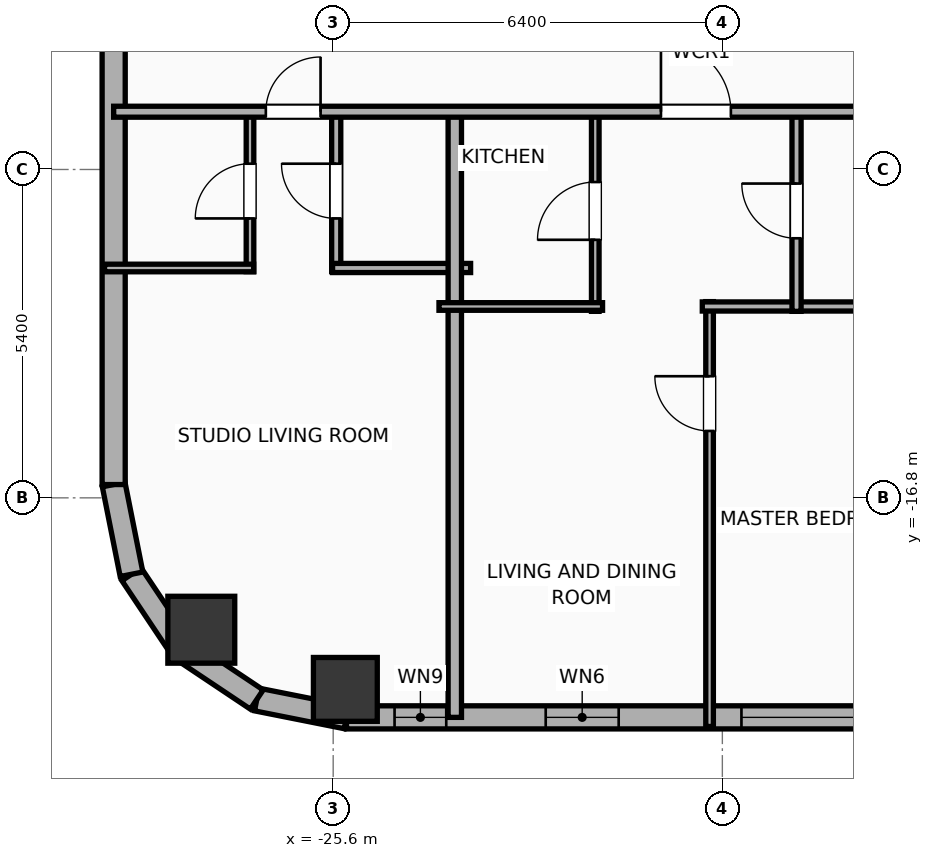
"""IFC4 building model, lengths in metres.
Left out: names, types, materials, properties, quantities, classifications, styles, units other than length and angle.
Written with IfcOpenShell. Run it as: python <this file> out.ifc"""

import sys

from ifc_helpers import new_model, si_unit, direction, frame, frame_2d, origin, origin_2d, place, context, subcontext, project, spatial, rectangle, hollow_rectangle, hollow_circle, extrude, element, fill, save


model = new_model("IFC4")
c1 = context("Model", 3, precision=1e-05, world=origin(), true_north=direction((0.0, 1.0)))
c2 = subcontext(c1, "Body", "Model", "MODEL_VIEW")
j1 = project(units=[si_unit("LENGTHUNIT", "METRE"), si_unit("PLANEANGLEUNIT", "RADIAN")], contexts=[c1])
p1 = place(None, origin())
s1 = spatial("IfcSite", under=j1, at=p1, CompositionType="ELEMENT")
p2 = place(p1, origin())
s2 = spatial("IfcBuilding", under=s1, at=p2, CompositionType="ELEMENT")
p3 = place(p2, frame((0.0, 0.0, 93.6)))
s3 = spatial("IfcBuildingStorey", under=s2, at=p3, CompositionType="ELEMENT", Elevation=93.6)
p4 = place(p3, frame((-25.4, -19.95, 0.0), z_axis=(0.0, 0.0, 1.0), x_axis=(1.0, 0.0, 0.0)))
e1 = element("IfcColumn", 1, at=p4, inside=s3, PredefinedType="COLUMN", context=c2, shape_type="SweptSolid", body=[
    extrude(hollow_rectangle(XDim=1.05, YDim=1.05, WallThickness=0.036, at=origin_2d()), origin(), (0.0, 0.0, 1.0), 3.9),
])
p5 = place(p3, frame((-27.769, -18.969, 0.0), z_axis=(0.0, 0.0, 1.0), x_axis=(1.0, 0.0, 0.0)))
e2 = element("IfcColumn", 2, at=p5, inside=s3, PredefinedType="COLUMN", context=c2, shape_type="SweptSolid", body=[
    extrude(hollow_circle(Radius=0.55, WallThickness=0.036, at=origin_2d()), origin(), (0.0, 0.0, 1.0), 3.9),
])
p6 = place(p3, frame((29.381, -20.41, 0.0), z_axis=(0.0, 0.0, 1.0), x_axis=(-1.0, 0.0, 0.0)))
e3 = element("IfcWall", 3, at=p6, inside=s3, PredefinedType="ELEMENTEDWALL", context=c2, shape_type="SweptSolid", body=[
    extrude(rectangle(XDim=54.763, YDim=0.38, at=frame_2d((27.381, 0.0))), origin(), (0.0, 0.0, 1.0), 3.65),
])
p7 = place(p6, frame((4.795, 0.0, 0.75)))
e4 = element("IfcOpeningElement", 4, at=p7, cuts=e3, PredefinedType="OPENING", context=c2, shape_type="SweptSolid", body=[
    extrude(rectangle(XDim=2.4, YDim=2.1, at=frame_2d((1.2, 1.05))), frame((0.0, 0.2, 0.0), z_axis=(0.0, -1.0, 0.0), x_axis=(1.0, 0.0, 0.0)), (0.0, 0.0, 1.0), 0.4),
])
p8 = place(p6, frame((33.877, 0.0, 0.75)))
e5 = element("IfcOpeningElement", 5, at=p8, cuts=e3, PredefinedType="OPENING", context=c2, shape_type="SweptSolid", body=[
    extrude(rectangle(XDim=2.4, YDim=2.1, at=frame_2d((1.2, 1.05))), frame((0.0, 0.2, 0.0), z_axis=(0.0, -1.0, 0.0), x_axis=(1.0, 0.0, 0.0)), (0.0, 0.0, 1.0), 0.4),
])
p9 = place(p6, frame((45.867, 0.0, 0.75)))
e6 = element("IfcOpeningElement", 6, at=p9, cuts=e3, PredefinedType="OPENING", context=c2, shape_type="SweptSolid", body=[
    extrude(rectangle(XDim=2.4, YDim=2.1, at=frame_2d((1.2, 1.05))), frame((0.0, 0.2, 0.0), z_axis=(0.0, -1.0, 0.0), x_axis=(1.0, 0.0, 0.0)), (0.0, 0.0, 1.0), 0.4),
])
p10 = place(p6, frame((53.122, 0.0, 0.75)))
e7 = element("IfcOpeningElement", 7, at=p10, cuts=e3, PredefinedType="OPENING", context=c2, shape_type="SweptSolid", body=[
    extrude(rectangle(XDim=0.85, YDim=2.05, at=frame_2d((0.425, 1.025))), frame((0.0, 0.2, 0.0), z_axis=(0.0, -1.0, 0.0), x_axis=(1.0, 0.0, 0.0)), (0.0, 0.0, 1.0), 0.4),
])
p11 = place(p6, frame((50.286, 0.0, 0.75)))
e8 = element("IfcOpeningElement", 8, at=p11, cuts=e3, PredefinedType="OPENING", context=c2, shape_type="SweptSolid", body=[
    extrude(rectangle(XDim=1.2, YDim=2.05, at=frame_2d((0.6, 1.025))), frame((0.0, 0.2, 0.0), z_axis=(0.0, -1.0, 0.0), x_axis=(1.0, 0.0, 0.0)), (0.0, 0.0, 1.0), 0.4),
])
p12 = place(p6, frame((41.846, 0.0, 0.75)))
e9 = element("IfcOpeningElement", 9, at=p12, cuts=e3, PredefinedType="OPENING", context=c2, shape_type="SweptSolid", body=[
    extrude(rectangle(XDim=1.2, YDim=2.05, at=frame_2d((0.6, 1.025))), frame((0.0, 0.2, 0.0), z_axis=(0.0, -1.0, 0.0), x_axis=(1.0, 0.0, 0.0)), (0.0, 0.0, 1.0), 0.4),
])
p13 = place(p6, frame((38.886, 0.0, 0.75)))
e10 = element("IfcOpeningElement", 10, at=p13, cuts=e3, PredefinedType="OPENING", context=c2, shape_type="SweptSolid", body=[
    extrude(rectangle(XDim=1.2, YDim=2.05, at=frame_2d((0.6, 1.025))), frame((0.0, 0.2, 0.0), z_axis=(0.0, -1.0, 0.0), x_axis=(1.0, 0.0, 0.0)), (0.0, 0.0, 1.0), 0.4),
])
p14 = place(p6, frame((30.926, 0.0, 0.75)))
e11 = element("IfcOpeningElement", 11, at=p14, cuts=e3, PredefinedType="OPENING", context=c2, shape_type="SweptSolid", body=[
    extrude(rectangle(XDim=1.2, YDim=2.05, at=frame_2d((0.6, 1.025))), frame((0.0, 0.2, 0.0), z_axis=(0.0, -1.0, 0.0), x_axis=(1.0, 0.0, 0.0)), (0.0, 0.0, 1.0), 0.4),
])
p15 = place(p6, frame((27.486, 0.0, 0.75)))
e12 = element("IfcOpeningElement", 12, at=p15, cuts=e3, PredefinedType="OPENING", context=c2, shape_type="SweptSolid", body=[
    extrude(rectangle(XDim=1.2, YDim=2.05, at=frame_2d((0.6, 1.025))), frame((0.0, 0.2, 0.0), z_axis=(0.0, -1.0, 0.0), x_axis=(1.0, 0.0, 0.0)), (0.0, 0.0, 1.0), 0.4),
])
p16 = place(p6, frame((23.686, 0.0, 0.75)))
e13 = element("IfcOpeningElement", 13, at=p16, cuts=e3, PredefinedType="OPENING", context=c2, shape_type="SweptSolid", body=[
    extrude(rectangle(XDim=1.2, YDim=2.05, at=frame_2d((0.6, 1.025))), frame((0.0, 0.2, 0.0), z_axis=(0.0, -1.0, 0.0), x_axis=(1.0, 0.0, 0.0)), (0.0, 0.0, 1.0), 0.4),
])
p17 = place(p6, frame((19.886, 0.0, 0.75)))
e14 = element("IfcOpeningElement", 14, at=p17, cuts=e3, PredefinedType="OPENING", context=c2, shape_type="SweptSolid", body=[
    extrude(rectangle(XDim=1.2, YDim=2.05, at=frame_2d((0.6, 1.025))), frame((0.0, 0.2, 0.0), z_axis=(0.0, -1.0, 0.0), x_axis=(1.0, 0.0, 0.0)), (0.0, 0.0, 1.0), 0.4),
])
p18 = place(p6, frame((16.086, 0.0, 0.75)))
e15 = element("IfcOpeningElement", 15, at=p18, cuts=e3, PredefinedType="OPENING", context=c2, shape_type="SweptSolid", body=[
    extrude(rectangle(XDim=1.2, YDim=2.05, at=frame_2d((0.6, 1.025))), frame((0.0, 0.2, 0.0), z_axis=(0.0, -1.0, 0.0), x_axis=(1.0, 0.0, 0.0)), (0.0, 0.0, 1.0), 0.4),
])
p19 = place(p6, frame((12.286, 0.0, 0.75)))
e16 = element("IfcOpeningElement", 16, at=p19, cuts=e3, PredefinedType="OPENING", context=c2, shape_type="SweptSolid", body=[
    extrude(rectangle(XDim=1.2, YDim=2.05, at=frame_2d((0.6, 1.025))), frame((0.0, 0.2, 0.0), z_axis=(0.0, -1.0, 0.0), x_axis=(1.0, 0.0, 0.0)), (0.0, 0.0, 1.0), 0.4),
])
p20 = place(p6, frame((8.486, 0.0, 0.75)))
e17 = element("IfcOpeningElement", 17, at=p20, cuts=e3, PredefinedType="OPENING", context=c2, shape_type="SweptSolid", body=[
    extrude(rectangle(XDim=1.2, YDim=2.05, at=frame_2d((0.6, 1.025))), frame((0.0, 0.2, 0.0), z_axis=(0.0, -1.0, 0.0), x_axis=(1.0, 0.0, 0.0)), (0.0, 0.0, 1.0), 0.4),
])
p21 = place(p6, frame((2.277, 0.0, 0.75)))
e18 = element("IfcOpeningElement", 18, at=p21, cuts=e3, PredefinedType="OPENING", context=c2, shape_type="SweptSolid", body=[
    extrude(rectangle(XDim=1.2, YDim=2.05, at=frame_2d((0.6, 1.025))), frame((0.0, 0.2, 0.0), z_axis=(0.0, -1.0, 0.0), x_axis=(1.0, 0.0, 0.0)), (0.0, 0.0, 1.0), 0.4),
])
p22 = place(p6, frame((1.071, 0.0, 0.75)))
e19 = element("IfcOpeningElement", 19, at=p22, cuts=e3, PredefinedType="OPENING", context=c2, shape_type="SweptSolid", body=[
    extrude(rectangle(XDim=0.52, YDim=2.05, at=frame_2d((0.26, 1.025))), frame((0.0, 0.2, 0.0), z_axis=(0.0, -1.0, 0.0), x_axis=(1.0, 0.0, 0.0)), (0.0, 0.0, 1.0), 0.4),
])
p23 = place(p3, frame((-25.381, -20.41, 0.0), z_axis=(0.0, 0.0, 1.0), x_axis=(-0.980786132421, 0.195086038585, 0.0)))
e20 = element("IfcWall", 20, at=p23, inside=s3, PredefinedType="ELEMENTEDWALL", context=c2, shape_type="SweptSolid", body=[
    extrude(rectangle(XDim=1.504, YDim=0.38, at=frame_2d((0.752, 0.0))), origin(), (0.0, 0.0, 1.0), 3.65),
])
p24 = place(p3, frame((-26.857, -20.116, 0.0), z_axis=(0.0, 0.0, 1.0), x_axis=(-0.831468045563, 0.555572577804, 0.0)))
e21 = element("IfcWall", 21, at=p24, inside=s3, PredefinedType="ELEMENTEDWALL", context=c2, shape_type="SweptSolid", body=[
    extrude(rectangle(XDim=1.485, YDim=0.38, at=frame_2d((0.742, 0.0))), origin(), (0.0, 0.0, 1.0), 3.65),
])
p25 = place(p3, frame((-28.091, -19.292, 0.0), z_axis=(0.0, 0.0, 1.0), x_axis=(-0.555610286119, 0.831442848281, 0.0)))
e22 = element("IfcWall", 22, at=p25, inside=s3, PredefinedType="ELEMENTEDWALL", context=c2, shape_type="SweptSolid", body=[
    extrude(rectangle(XDim=1.485, YDim=0.38, at=frame_2d((0.743, 0.0))), origin(), (0.0, 0.0, 1.0), 3.65),
])
p26 = place(p3, frame((-28.917, -18.057, 0.0), z_axis=(0.0, 0.0, 1.0), x_axis=(-0.195086038585, 0.980786132421, 0.0)))
e23 = element("IfcWall", 23, at=p26, inside=s3, PredefinedType="ELEMENTEDWALL", context=c2, shape_type="SweptSolid", body=[
    extrude(rectangle(XDim=1.504, YDim=0.38, at=frame_2d((0.752, 0.0))), origin(), (0.0, 0.0, 1.0), 3.65),
])
p27 = place(p3, frame((-29.21, -16.581, 0.0), z_axis=(0.0, 0.0, 1.0), x_axis=(0.0, 1.0, 0.0)))
e24 = element("IfcWall", 24, at=p27, inside=s3, PredefinedType="ELEMENTEDWALL", context=c2, shape_type="SweptSolid", body=[
    extrude(rectangle(XDim=34.363, YDim=0.38, at=frame_2d((17.181, 0.0))), origin(), (0.0, 0.0, 1.0), 3.65),
])
p28 = place(p27, frame((30.932, 0.0, 0.75)))
e25 = element("IfcOpeningElement", 25, at=p28, cuts=e24, PredefinedType="OPENING", context=c2, shape_type="SweptSolid", body=[
    extrude(rectangle(XDim=1.2, YDim=2.05, at=frame_2d((0.6, 1.025))), frame((0.0, 0.2, 0.0), z_axis=(0.0, -1.0, 0.0), x_axis=(1.0, 0.0, 0.0)), (0.0, 0.0, 1.0), 0.4),
])
p29 = place(p27, frame((20.501, 0.0, 0.75)))
e26 = element("IfcOpeningElement", 26, at=p29, cuts=e24, PredefinedType="OPENING", context=c2, shape_type="SweptSolid", body=[
    extrude(rectangle(XDim=1.2, YDim=2.05, at=frame_2d((0.6, 1.025))), frame((0.0, 0.2, 0.0), z_axis=(0.0, -1.0, 0.0), x_axis=(1.0, 0.0, 0.0)), (0.0, 0.0, 1.0), 0.4),
])
p30 = place(p27, frame((11.601, 0.0, 0.75)))
e27 = element("IfcOpeningElement", 27, at=p30, cuts=e24, PredefinedType="OPENING", context=c2, shape_type="SweptSolid", body=[
    extrude(rectangle(XDim=1.2, YDim=2.05, at=frame_2d((0.6, 1.025))), frame((0.0, 0.2, 0.0), z_axis=(0.0, -1.0, 0.0), x_axis=(1.0, 0.0, 0.0)), (0.0, 0.0, 1.0), 0.4),
])
p31 = place(p3, frame((-26.968, -13.08, 0.0), z_axis=(0.0, 0.0, 1.0), x_axis=(0.0, 1.0, 0.0)))
e28 = element("IfcWall", 28, at=p31, inside=s3, PredefinedType="PARTITIONING", context=c2, shape_type="SweptSolid", body=[
    extrude(rectangle(XDim=2.65, YDim=0.125, at=frame_2d((1.325, 0.0))), origin(), (0.0, 0.0, 1.0), 3.65),
])
p32 = place(p31, frame((0.875, 0.0, 0.0)))
e29 = element("IfcOpeningElement", 29, at=p32, cuts=e28, PredefinedType="OPENING", context=c2, shape_type="SweptSolid", body=[
    extrude(rectangle(XDim=0.9, YDim=2.05, at=frame_2d((0.45, 1.025))), frame((0.0, 0.073, 0.0), z_axis=(0.0, -1.0, 0.0), x_axis=(1.0, 0.0, 0.0)), (0.0, 0.0, 1.0), 0.145),
])
p33 = place(p3, frame((-25.55, -13.08, 0.0), z_axis=(0.0, 0.0, 1.0), x_axis=(0.0, 1.0, 0.0)))
e30 = element("IfcWall", 30, at=p33, inside=s3, PredefinedType="PLUMBINGWALL", context=c2, shape_type="SweptSolid", body=[
    extrude(rectangle(XDim=2.65, YDim=0.15, at=frame_2d((1.325, 0.0))), origin(), (0.0, 0.0, 1.0), 3.65),
])
p34 = place(p33, frame((0.875, 0.0, 0.0)))
e31 = element("IfcOpeningElement", 31, at=p34, cuts=e30, PredefinedType="OPENING", context=c2, shape_type="SweptSolid", body=[
    extrude(rectangle(XDim=0.9, YDim=2.05, at=frame_2d((0.45, 1.025))), frame((0.0, 0.085, 0.0), z_axis=(0.0, -1.0, 0.0), x_axis=(1.0, 0.0, 0.0)), (0.0, 0.0, 1.0), 0.17),
])
p35 = place(p3, frame((-29.36, -13.02, 0.0), z_axis=(0.0, 0.0, 1.0), x_axis=(1.0, 0.0, 0.0)))
e32 = element("IfcWall", 32, at=p35, inside=s3, PredefinedType="PARTITIONING", context=c2, shape_type="SweptSolid", body=[
    extrude(rectangle(XDim=2.452, YDim=0.125, at=frame_2d((1.226, 0.0))), origin(), (0.0, 0.0, 1.0), 3.65),
])
p36 = place(p3, frame((-25.61, -13.02, 0.0), z_axis=(0.0, 0.0, 1.0), x_axis=(1.0, 0.0, 0.0)))
e33 = element("IfcWall", 33, at=p36, inside=s3, PredefinedType="PLUMBINGWALL", context=c2, shape_type="SweptSolid", body=[
    extrude(rectangle(XDim=2.27, YDim=0.15, at=frame_2d((1.135, 0.0))), origin(), (0.0, 0.0, 1.0), 3.65),
])
p37 = place(p3, frame((-23.6, -20.41, 0.0), z_axis=(0.0, 0.0, 1.0), x_axis=(0.0, 1.0, 0.0)))
e34 = element("IfcWall", 34, at=p37, inside=s3, PredefinedType="PARTITIONING", context=c2, shape_type="SweptSolid", body=[
    extrude(rectangle(XDim=10.04, YDim=0.22, at=frame_2d((5.02, 0.0))), origin(), (0.0, 0.0, 1.0), 3.65),
])
p38 = place(p3, frame((-19.41, -20.56, 0.0), z_axis=(0.0, 0.0, 1.0), x_axis=(0.0, 1.0, 0.0)))
e35 = element("IfcWall", 35, at=p38, inside=s3, PredefinedType="PARTITIONING", context=c2, shape_type="SweptSolid", body=[
    extrude(rectangle(XDim=6.987, YDim=0.125, at=frame_2d((3.494, 0.0))), origin(), (0.0, 0.0, 1.0), 3.65),
])
p39 = place(p38, frame((4.86, 0.0, 0.0)))
e36 = element("IfcOpeningElement", 36, at=p39, cuts=e35, PredefinedType="OPENING", context=c2, shape_type="SweptSolid", body=[
    extrude(rectangle(XDim=0.9, YDim=2.05, at=frame_2d((0.45, 1.025))), frame((0.0, 0.073, 0.0), z_axis=(0.0, -1.0, 0.0), x_axis=(1.0, 0.0, 0.0)), (0.0, 0.0, 1.0), 0.145),
])
p40 = place(p3, frame((-19.53, -13.653, 0.0), z_axis=(0.0, 0.0, 1.0), x_axis=(1.0, 0.0, 0.0)))
e37 = element("IfcWall", 37, at=p40, inside=s3, PredefinedType="PLUMBINGWALL", context=c2, shape_type="SweptSolid", body=[
    extrude(rectangle(XDim=3.79, YDim=0.15, at=frame_2d((1.895, 0.0))), origin(), (0.0, 0.0, 1.0), 3.65),
])
p41 = place(p3, frame((-21.29, -13.733, 0.0), z_axis=(0.0, 0.0, 1.0), x_axis=(0.0, 1.0, 0.0)))
e38 = element("IfcWall", 38, at=p41, inside=s3, PredefinedType="PARTITIONING", context=c2, shape_type="SweptSolid", body=[
    extrude(rectangle(XDim=3.303, YDim=0.125, at=frame_2d((1.651, 0.0))), origin(), (0.0, 0.0, 1.0), 3.65),
])
p42 = place(p41, frame((1.177, 0.0, 0.0)))
e39 = element("IfcOpeningElement", 39, at=p42, cuts=e38, PredefinedType="OPENING", context=c2, shape_type="SweptSolid", body=[
    extrude(rectangle(XDim=0.95, YDim=2.05, at=frame_2d((0.475, 1.025))), frame((0.0, 0.073, 0.0), z_axis=(0.0, -1.0, 0.0), x_axis=(1.0, 0.0, 0.0)), (0.0, 0.0, 1.0), 0.145),
])
p43 = place(p3, frame((-23.86, -13.653, 0.0), z_axis=(0.0, 0.0, 1.0), x_axis=(1.0, 0.0, 0.0)))
e40 = element("IfcWall", 40, at=p43, inside=s3, PredefinedType="PARTITIONING", context=c2, shape_type="SweptSolid", body=[
    extrude(rectangle(XDim=2.69, YDim=0.125, at=frame_2d((1.345, 0.0))), origin(), (0.0, 0.0, 1.0), 3.65),
])
p44 = place(p3, frame((-17.98, -13.733, 0.0), z_axis=(0.0, 0.0, 1.0), x_axis=(0.0, 1.0, 0.0)))
e41 = element("IfcWall", 41, at=p44, inside=s3, PredefinedType="PLUMBINGWALL", context=c2, shape_type="SweptSolid", body=[
    extrude(rectangle(XDim=3.303, YDim=0.15, at=frame_2d((1.651, 0.0))), origin(), (0.0, 0.0, 1.0), 3.65),
])
p45 = place(p44, frame((1.201, 0.0, 0.0)))
e42 = element("IfcOpeningElement", 42, at=p45, cuts=e41, PredefinedType="OPENING", context=c2, shape_type="SweptSolid", body=[
    extrude(rectangle(XDim=0.9, YDim=2.05, at=frame_2d((0.45, 1.025))), frame((0.0, 0.085, 0.0), z_axis=(0.0, -1.0, 0.0), x_axis=(1.0, 0.0, 0.0)), (0.0, 0.0, 1.0), 0.17),
])
p46 = place(p3, frame((-29.21, -10.45, 0.0), z_axis=(0.0, 0.0, 1.0), x_axis=(1.0, 0.0, 0.0)))
e43 = element("IfcWall", 43, at=p46, inside=s3, PredefinedType="PARTITIONING", context=c2, shape_type="SweptSolid", body=[
    extrude(rectangle(XDim=62.42, YDim=0.18, at=frame_2d((31.21, 0.0))), origin(), (0.0, 0.0, 1.0), 3.65),
])
p47 = place(p46, frame((2.502, 0.0, 0.0)))
e44 = element("IfcOpeningElement", 44, at=p47, cuts=e43, PredefinedType="OPENING", context=c2, shape_type="SweptSolid", body=[
    extrude(rectangle(XDim=0.9, YDim=2.05, at=frame_2d((0.45, 1.025))), frame((0.0, 0.1, 0.0), z_axis=(0.0, -1.0, 0.0), x_axis=(1.0, 0.0, 0.0)), (0.0, 0.0, 1.0), 0.2),
])
p48 = place(p46, frame((9.0, 0.0, 0.0)))
e45 = element("IfcOpeningElement", 45, at=p48, cuts=e43, PredefinedType="OPENING", context=c2, shape_type="SweptSolid", body=[
    extrude(rectangle(XDim=1.15, YDim=2.05, at=frame_2d((0.575, 1.025))), frame((0.0, 0.1, 0.0), z_axis=(0.0, -1.0, 0.0), x_axis=(1.0, 0.0, 0.0)), (0.0, 0.0, 1.0), 0.2),
])
p49 = place(p46, frame((16.603, 0.0, 0.0)))
e46 = element("IfcOpeningElement", 46, at=p49, cuts=e43, PredefinedType="OPENING", context=c2, shape_type="SweptSolid", body=[
    extrude(rectangle(XDim=1.15, YDim=2.05, at=frame_2d((0.575, 1.025))), frame((0.0, 0.1, 0.0), z_axis=(0.0, -1.0, 0.0), x_axis=(1.0, 0.0, 0.0)), (0.0, 0.0, 1.0), 0.2),
])
p50 = place(p46, frame((24.199, 0.0, 0.0)))
e47 = element("IfcOpeningElement", 47, at=p50, cuts=e43, PredefinedType="OPENING", context=c2, shape_type="SweptSolid", body=[
    extrude(rectangle(XDim=1.15, YDim=2.05, at=frame_2d((0.575, 1.025))), frame((0.0, 0.1, 0.0), z_axis=(0.0, -1.0, 0.0), x_axis=(1.0, 0.0, 0.0)), (0.0, 0.0, 1.0), 0.2),
])
p51 = place(p46, frame((31.802, 0.0, 0.0)))
e48 = element("IfcOpeningElement", 48, at=p51, cuts=e43, PredefinedType="OPENING", context=c2, shape_type="SweptSolid", body=[
    extrude(rectangle(XDim=1.15, YDim=2.05, at=frame_2d((0.575, 1.025))), frame((0.0, 0.1, 0.0), z_axis=(0.0, -1.0, 0.0), x_axis=(1.0, 0.0, 0.0)), (0.0, 0.0, 1.0), 0.2),
])
p52 = place(p46, frame((39.399, 0.0, 0.0)))
e49 = element("IfcOpeningElement", 49, at=p52, cuts=e43, PredefinedType="OPENING", context=c2, shape_type="SweptSolid", body=[
    extrude(rectangle(XDim=1.15, YDim=2.05, at=frame_2d((0.575, 1.025))), frame((0.0, 0.1, 0.0), z_axis=(0.0, -1.0, 0.0), x_axis=(1.0, 0.0, 0.0)), (0.0, 0.0, 1.0), 0.2),
])
p53 = place(p46, frame((47.001, 0.0, 0.0)))
e50 = element("IfcOpeningElement", 50, at=p53, cuts=e43, PredefinedType="OPENING", context=c2, shape_type="SweptSolid", body=[
    extrude(rectangle(XDim=1.15, YDim=2.05, at=frame_2d((0.575, 1.025))), frame((0.0, 0.1, 0.0), z_axis=(0.0, -1.0, 0.0), x_axis=(1.0, 0.0, 0.0)), (0.0, 0.0, 1.0), 0.2),
])
p54 = place(p46, frame((52.363, 0.0, 0.0)))
e51 = element("IfcOpeningElement", 51, at=p54, cuts=e43, PredefinedType="OPENING", context=c2, shape_type="SweptSolid", body=[
    extrude(rectangle(XDim=1.15, YDim=2.05, at=frame_2d((0.575, 1.025))), frame((0.0, 0.1, 0.0), z_axis=(0.0, -1.0, 0.0), x_axis=(1.0, 0.0, 0.0)), (0.0, 0.0, 1.0), 0.2),
])
p55 = place(p46, frame((59.386, 0.0, 0.0)))
e52 = element("IfcOpeningElement", 52, at=p55, cuts=e43, PredefinedType="OPENING", context=c2, shape_type="SweptSolid", body=[
    extrude(rectangle(XDim=0.9, YDim=2.05, at=frame_2d((0.45, 1.025))), frame((0.0, 0.1, 0.0), z_axis=(0.0, -1.0, 0.0), x_axis=(1.0, 0.0, 0.0)), (0.0, 0.0, 1.0), 0.2),
])
p56 = place(p9, origin())
e53 = element("IfcWindow", 53, at=p56, inside=s3, PartitioningType="SINGLE_PANEL", PredefinedType="WINDOW", context=c2, shape_type="SweptSolid", body=[
    extrude(rectangle(XDim=2.4, YDim=2.1, at=frame_2d((1.2, 1.05))), frame((0.0, 0.03, 0.0), z_axis=(0.0, -1.0, 0.0), x_axis=(1.0, 0.0, 0.0)), (0.0, 0.0, 1.0), 0.06),
])
fill(e6, e53)
p57 = place(p10, origin())
e54 = element("IfcWindow", 54, at=p57, inside=s3, PartitioningType="SINGLE_PANEL", PredefinedType="WINDOW", context=c2, shape_type="SweptSolid", body=[
    extrude(rectangle(XDim=0.85, YDim=2.05, at=frame_2d((0.425, 1.025))), frame((0.0, 0.03, 0.0), z_axis=(0.0, -1.0, 0.0), x_axis=(1.0, 0.0, 0.0)), (0.0, 0.0, 1.0), 0.06),
])
fill(e7, e54)
p58 = place(p11, origin())
e55 = element("IfcWindow", 55, at=p58, inside=s3, PartitioningType="SINGLE_PANEL", PredefinedType="WINDOW", context=c2, shape_type="SweptSolid", body=[
    extrude(rectangle(XDim=1.2, YDim=2.05, at=frame_2d((0.6, 1.025))), frame((0.0, 0.03, 0.0), z_axis=(0.0, -1.0, 0.0), x_axis=(1.0, 0.0, 0.0)), (0.0, 0.0, 1.0), 0.06),
])
fill(e8, e55)
p59 = place(p32, origin())
e56 = element("IfcDoor", 56, at=p59, inside=s3, OperationType="SINGLE_SWING_LEFT", PredefinedType="DOOR", context=c2, shape_type="SweptSolid", body=[
    extrude(rectangle(XDim=0.9, YDim=2.05, at=frame_2d((0.45, 1.025))), frame((0.0, 0.025, 0.0), z_axis=(0.0, -1.0, 0.0), x_axis=(1.0, 0.0, 0.0)), (0.0, 0.0, 1.0), 0.05),
])
fill(e29, e56)
p60 = place(p34, origin())
e57 = element("IfcDoor", 57, at=p60, inside=s3, OperationType="SINGLE_SWING_RIGHT", PredefinedType="DOOR", context=c2, shape_type="SweptSolid", body=[
    extrude(rectangle(XDim=0.9, YDim=2.05, at=frame_2d((0.45, 1.025))), frame((0.0, 0.025, 0.0), z_axis=(0.0, -1.0, 0.0), x_axis=(1.0, 0.0, 0.0)), (0.0, 0.0, 1.0), 0.05),
])
fill(e31, e57)
p61 = place(p39, origin())
e58 = element("IfcDoor", 58, at=p61, inside=s3, OperationType="SINGLE_SWING_RIGHT", PredefinedType="DOOR", context=c2, shape_type="SweptSolid", body=[
    extrude(rectangle(XDim=0.9, YDim=2.05, at=frame_2d((0.45, 1.025))), frame((0.0, 0.025, 0.0), z_axis=(0.0, -1.0, 0.0), x_axis=(1.0, 0.0, 0.0)), (0.0, 0.0, 1.0), 0.05),
])
fill(e36, e58)
p62 = place(p42, origin())
e59 = element("IfcDoor", 59, at=p62, inside=s3, OperationType="SINGLE_SWING_LEFT", PredefinedType="DOOR", context=c2, shape_type="SweptSolid", body=[
    extrude(rectangle(XDim=0.95, YDim=2.05, at=frame_2d((0.475, 1.025))), frame((0.0, 0.025, 0.0), z_axis=(0.0, -1.0, 0.0), x_axis=(1.0, 0.0, 0.0)), (0.0, 0.0, 1.0), 0.05),
])
fill(e39, e59)
p63 = place(p45, origin())
e60 = element("IfcDoor", 60, at=p63, inside=s3, OperationType="SINGLE_SWING_RIGHT", PredefinedType="DOOR", context=c2, shape_type="SweptSolid", body=[
    extrude(rectangle(XDim=0.9, YDim=2.05, at=frame_2d((0.45, 1.025))), frame((0.0, 0.025, 0.0), z_axis=(0.0, -1.0, 0.0), x_axis=(1.0, 0.0, 0.0)), (0.0, 0.0, 1.0), 0.05),
])
fill(e42, e60)
p64 = place(p47, origin())
e61 = element("IfcDoor", 61, at=p64, inside=s3, OperationType="SINGLE_SWING_RIGHT", PredefinedType="DOOR", context=c2, shape_type="SweptSolid", body=[
    extrude(rectangle(XDim=0.9, YDim=2.05, at=frame_2d((0.45, 1.025))), frame((0.0, 0.025, 0.0), z_axis=(0.0, -1.0, 0.0), x_axis=(1.0, 0.0, 0.0)), (0.0, 0.0, 1.0), 0.05),
])
fill(e44, e61)
p65 = place(p48, origin())
e62 = element("IfcDoor", 62, at=p65, inside=s3, OperationType="SINGLE_SWING_LEFT", PredefinedType="DOOR", context=c2, shape_type="SweptSolid", body=[
    extrude(rectangle(XDim=1.15, YDim=2.05, at=frame_2d((0.575, 1.025))), frame((0.0, 0.025, 0.0), z_axis=(0.0, -1.0, 0.0), x_axis=(1.0, 0.0, 0.0)), (0.0, 0.0, 1.0), 0.05),
])
fill(e45, e62)
save(model, sys.argv[1])
